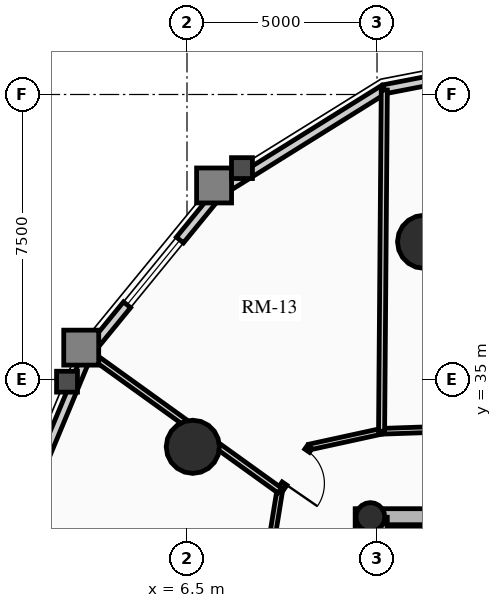
"""IFC4 building model, lengths in metres.
Left out: names, types, materials, properties, quantities, classifications, styles, units other than length and angle.
Written with IfcOpenShell. Run it as: python <this file> out.ifc"""

import sys

from ifc_helpers import new_model, si_unit, direction, frame, frame_2d, origin, origin_2d, place, context, subcontext, project, spatial, rectangle, circle, hollow_circle, extrude, source, transform, mapped, element, fill, save


model = new_model("IFC4")
c1 = context("Model", 3, precision=1e-05, world=origin(), true_north=direction((0.0, 1.0)))
c2 = subcontext(c1, "Body", "Model", "MODEL_VIEW")
j1 = project(units=[si_unit("LENGTHUNIT", "METRE"), si_unit("PLANEANGLEUNIT", "RADIAN")], contexts=[c1])
p1 = place(None, origin())
s1 = spatial("IfcSite", under=j1, at=p1, CompositionType="ELEMENT")
p2 = place(p1, origin())
s2 = spatial("IfcBuilding", under=s1, at=p2, CompositionType="ELEMENT")
p3 = place(p2, frame((0.0, 0.0, 84.7)))
s3 = spatial("IfcBuildingStorey", under=s2, at=p3, CompositionType="ELEMENT", Elevation=84.7)
p4 = place(p3, frame((11.15, 17.4, 0.0), z_axis=(0.0, 0.0, 1.0), x_axis=(0.0, 1.0, 0.0)))
e1 = element("IfcWall", 1, at=p4, inside=s3, PredefinedType="SHEAR", context=c2, shape_type="SweptSolid", body=[
    extrude(rectangle(XDim=14.2, YDim=0.45, at=frame_2d((7.1, 0.0))), origin(), (0.0, 0.0, 1.0), 2.91),
])
p5 = place(p3, frame((11.15, 31.375, 0.0), z_axis=(0.0, 0.0, 1.0), x_axis=(1.0, 0.0, 0.0)))
e2 = element("IfcWall", 2, at=p5, inside=s3, PredefinedType="SHEAR", context=c2, shape_type="SweptSolid", body=[
    extrude(rectangle(XDim=10.7, YDim=0.45, at=frame_2d((5.35, 0.0))), origin(), (0.0, 0.0, 1.0), 2.91),
])
m1 = source(origin(), c2, "Body", "SweptSolid", [
    extrude(rectangle(XDim=1.5, YDim=2.02, at=frame_2d((0.75, 1.01))), frame((0.0, 0.235, 0.0), z_axis=(0.0, -1.0, 0.0), x_axis=(1.0, 0.0, 0.0)), (0.0, 0.0, 1.0), 0.47),
])
p6 = place(p5, frame((4.6, 0.0, 0.0)))
e3 = element("IfcOpeningElement", 3, at=p6, cuts=e2, PredefinedType="OPENING", context=c2, shape_type="MappedRepresentation", body=[
    mapped(m1, transform((0.0, 0.0, 0.0), x_axis=(1.0, 0.0, 0.0), y_axis=(0.0, 1.0, 0.0), z_axis=(0.0, 0.0, 1.0), scale=1.0)),
])
p7 = place(p3, frame((11.595, 24.655, 0.0), z_axis=(0.0, 0.0, 1.0), x_axis=(0.0, 1.0, 0.0)))
e4 = element("IfcWall", 4, at=p7, inside=s3, PredefinedType="SHEAR", context=c2, shape_type="SweptSolid", body=[
    extrude(rectangle(XDim=6.72, YDim=0.35, at=frame_2d((3.36, 0.0))), origin(), (0.0, 0.0, 1.0), 2.91),
])
p8 = place(p3, frame((11.325, 31.38, 0.0), z_axis=(0.0, 0.0, 1.0), x_axis=(1.0, 0.0, 0.0)))
e5 = element("IfcColumn", 5, at=p8, inside=s3, PredefinedType="COLUMN", context=c2, shape_type="SweptSolid", body=[
    extrude(hollow_circle(Radius=0.38, WallThickness=0.032, at=origin_2d()), origin(), (0.0, 0.0, 1.0), 2.91),
])
for number, where, z_axis, x_axis in (
    (6, (12.739, 38.623, 0.0), (0.0, 0.0, 1.0), (1.0, 0.0, 0.0)),
    (7, (6.653, 33.229, 0.0), (0.0, 0.0, 1.0), (1.0, 0.0, 0.0)),
):
    element("IfcColumn", number, at=place(p3, frame(where, z_axis=z_axis, x_axis=x_axis)), inside=s3, PredefinedType="USERDEFINED", context=c2, shape_type="SweptSolid", body=[
        extrude(circle(Radius=0.7, at=origin_2d()), origin(), (0.0, 0.0, 1.0), 2.91),
    ])
p9 = place(p3, frame((11.685, 42.637, 0.0), z_axis=(0.0, 0.0, 1.0), x_axis=(0.981723785992, 0.190311344954, 0.0)))
e8 = element("IfcWall", 8, at=p9, inside=s3, PredefinedType="SOLIDWALL", context=c2, shape_type="SweptSolid", body=[
    extrude(rectangle(XDim=4.904, YDim=0.24, at=frame_2d((2.452, 0.0))), origin(), (0.0, 0.0, 1.0), 2.179),
])
m2 = source(origin(), c2, "Body", "SweptSolid", [
    extrude(rectangle(XDim=1.9, YDim=1.35, at=frame_2d((0.95, 0.675))), frame((0.0, 0.13, 0.0), z_axis=(0.0, -1.0, 0.0), x_axis=(1.0, 0.0, 0.0)), (0.0, 0.0, 1.0), 0.26),
])
p10 = place(p9, frame((1.502, 0.0, 0.65)))
e9 = element("IfcOpeningElement", 9, at=p10, cuts=e8, PredefinedType="OPENING", context=c2, shape_type="MappedRepresentation", body=[
    mapped(m2, transform((0.0, 0.0, 0.0), x_axis=(1.0, 0.0, 0.0), y_axis=(0.0, 1.0, 0.0), z_axis=(0.0, 0.0, 1.0), scale=1.0)),
])
p11 = place(p3, frame((7.342, 39.928, 0.0), z_axis=(0.0, 0.0, 1.0), x_axis=(0.848520380187, 0.529162701263, 0.0)))
e10 = element("IfcWall", 10, at=p11, inside=s3, PredefinedType="SOLIDWALL", context=c2, shape_type="SweptSolid", body=[
    extrude(rectangle(XDim=5.119, YDim=0.24, at=frame_2d((2.56, 0.0))), origin(), (0.0, 0.0, 1.0), 2.179),
])
p12 = place(p3, frame((3.895, 35.709, 0.0), z_axis=(0.0, 0.0, 1.0), x_axis=(0.632700781152, 0.77439635945, 0.0)))
e11 = element("IfcWall", 11, at=p12, inside=s3, PredefinedType="SOLIDWALL", context=c2, shape_type="SweptSolid", body=[
    extrude(rectangle(XDim=5.448, YDim=0.24, at=frame_2d((2.724, 0.0))), origin(), (0.0, 0.0, 1.0), 2.179),
])
m3 = source(origin(), c2, "Body", "SweptSolid", [
    extrude(rectangle(XDim=2.2, YDim=1.35, at=frame_2d((1.1, 0.675))), frame((0.0, 0.13, 0.0), z_axis=(0.0, -1.0, 0.0), x_axis=(1.0, 0.0, 0.0)), (0.0, 0.0, 1.0), 0.26),
])
p13 = place(p12, frame((1.624, 0.0, 0.65)))
e12 = element("IfcOpeningElement", 12, at=p13, cuts=e11, PredefinedType="OPENING", context=c2, shape_type="MappedRepresentation", body=[
    mapped(m3, transform((0.0, 0.0, 0.0), x_axis=(1.0, 0.0, 0.0), y_axis=(0.0, 1.0, 0.0), z_axis=(0.0, 0.0, 1.0), scale=1.0)),
])
p14 = place(p3, frame((1.682, 30.393, 0.0), z_axis=(0.0, 0.0, 1.0), x_axis=(0.384344417632, 0.923189779317, 0.0)))
e13 = element("IfcWall", 13, at=p14, inside=s3, PredefinedType="SOLIDWALL", context=c2, shape_type="SweptSolid", body=[
    extrude(rectangle(XDim=5.758, YDim=0.24, at=frame_2d((2.879, 0.0))), origin(), (0.0, 0.0, 1.0), 2.179),
])
p15 = place(p3, frame((18.143, 33.86, 0.0), z_axis=(0.0, 0.0, 1.0), x_axis=(-0.999419208319, -0.034077060363, 0.0)))
e14 = element("IfcWall", 14, at=p15, inside=s3, PredefinedType="PARTITIONING", context=c2, shape_type="SweptSolid", body=[
    extrude(rectangle(XDim=6.527, YDim=0.15, at=frame_2d((3.263, 0.0))), origin(), (0.0, 0.0, 1.0), 2.225),
])
m4 = source(origin(), c2, "Body", "SweptSolid", [
    extrude(rectangle(XDim=1.05, YDim=2.015, at=frame_2d((0.525, 1.007))), frame((0.0, 0.085, 0.0), z_axis=(0.0, -1.0, 0.0), x_axis=(1.0, 0.0, 0.0)), (0.0, 0.0, 1.0), 0.17),
])
p16 = place(p15, frame((2.738, 0.0, 0.0)))
e15 = element("IfcOpeningElement", 15, at=p16, cuts=e14, PredefinedType="OPENING", context=c2, shape_type="MappedRepresentation", body=[
    mapped(m4, transform((0.0, 0.0, 0.0), x_axis=(1.0, 0.0, 0.0), y_axis=(0.0, 1.0, 0.0), z_axis=(0.0, 0.0, 1.0), scale=1.0)),
])
p17 = place(p3, frame((11.62, 33.637, 0.0), z_axis=(0.0, 0.0, 1.0), x_axis=(-0.97702579435, -0.213121085711, 0.0)))
e16 = element("IfcWall", 16, at=p17, inside=s3, PredefinedType="PARTITIONING", context=c2, shape_type="SweptSolid", body=[
    extrude(rectangle(XDim=1.935, YDim=0.15, at=frame_2d((0.967, 0.0))), origin(), (0.0, 0.0, 1.0), 2.225),
])
p18 = place(p3, frame((9.729, 33.225, 0.0), z_axis=(0.0, 0.0, 1.0), x_axis=(-0.567183649484, -0.82359134755, 0.0)))
e17 = element("IfcWall", 17, at=p18, inside=s3, PredefinedType="PARTITIONING", context=c2, shape_type="SweptSolid", body=[
    extrude(rectangle(XDim=1.392, YDim=0.15, at=frame_2d((0.696, 0.0))), origin(), (0.0, 0.0, 1.0), 2.225),
])
p19 = place(p18, frame((0.12, 0.0, 0.0)))
e18 = element("IfcOpeningElement", 18, at=p19, cuts=e17, PredefinedType="OPENING", context=c2, shape_type="MappedRepresentation", body=[
    mapped(m4, transform((0.0, 0.0, 0.0), x_axis=(1.0, 0.0, 0.0), y_axis=(0.0, 1.0, 0.0), z_axis=(0.0, 0.0, 1.0), scale=1.0)),
])
p20 = place(p3, frame((8.94, 32.078, 0.0), z_axis=(0.0, 0.0, 1.0), x_axis=(-0.159148467753, -0.98725466077, 0.0)))
e19 = element("IfcWall", 19, at=p20, inside=s3, PredefinedType="PARTITIONING", context=c2, shape_type="SweptSolid", body=[
    extrude(rectangle(XDim=1.554, YDim=0.15, at=frame_2d((0.777, 0.0))), origin(), (0.0, 0.0, 1.0), 2.225),
])
p21 = place(p3, frame((11.62, 33.637, 0.0), z_axis=(0.0, 0.0, 1.0), x_axis=(0.007965167065, 0.999968277554, 0.0)))
e20 = element("IfcWall", 20, at=p21, inside=s3, PredefinedType="PARTITIONING", context=c2, shape_type="SweptSolid", body=[
    extrude(rectangle(XDim=8.981, YDim=0.16, at=frame_2d((4.49, 0.0))), origin(), (0.0, 0.0, 1.0), 2.179),
])
p22 = place(p3, frame((8.94, 32.078, 0.0), z_axis=(0.0, 0.0, 1.0), x_axis=(-0.811689023641, 0.584089829479, 0.0)))
e21 = element("IfcWall", 21, at=p22, inside=s3, PredefinedType="PARTITIONING", context=c2, shape_type="SweptSolid", body=[
    extrude(rectangle(XDim=6.196, YDim=0.16, at=frame_2d((3.098, 0.0))), origin(), (0.0, 0.0, 1.0), 2.179),
])
m5 = source(origin(), c2, "Body", "SweptSolid", [
    extrude(rectangle(XDim=2.2, YDim=1.35, at=frame_2d((1.1, 0.675))), frame((0.0, 0.03, 0.0), z_axis=(0.0, -1.0, 0.0), x_axis=(1.0, 0.0, 0.0)), (0.0, 0.0, 1.0), 0.06),
])
p23 = place(p13, origin())
e22 = element("IfcWindow", 22, at=p23, inside=s3, PartitioningType="DOUBLE_PANEL_VERTICAL", PredefinedType="WINDOW", context=c2, shape_type="MappedRepresentation", body=[
    mapped(m5, transform((0.0, 0.0, 0.0), x_axis=(1.0, 0.0, 0.0), y_axis=(0.0, 1.0, 0.0), z_axis=(0.0, 0.0, 1.0), scale=1.0)),
])
fill(e12, e22)
m6 = source(origin(), c2, "Body", "SweptSolid", [
    extrude(rectangle(XDim=1.05, YDim=2.015, at=frame_2d((0.525, 1.007))), frame((0.0, 0.025, 0.0), z_axis=(0.0, -1.0, 0.0), x_axis=(1.0, 0.0, 0.0)), (0.0, 0.0, 1.0), 0.05),
])
p24 = place(p19, origin())
e23 = element("IfcDoor", 23, at=p24, inside=s3, OperationType="SINGLE_SWING_RIGHT", PredefinedType="DOOR", context=c2, shape_type="MappedRepresentation", body=[
    mapped(m6, transform((0.0, 0.0, 0.0), x_axis=(1.0, 0.0, 0.0), y_axis=(0.0, 1.0, 0.0), z_axis=(0.0, 0.0, 1.0), scale=1.0)),
])
fill(e18, e23)
save(model, sys.argv[1])
